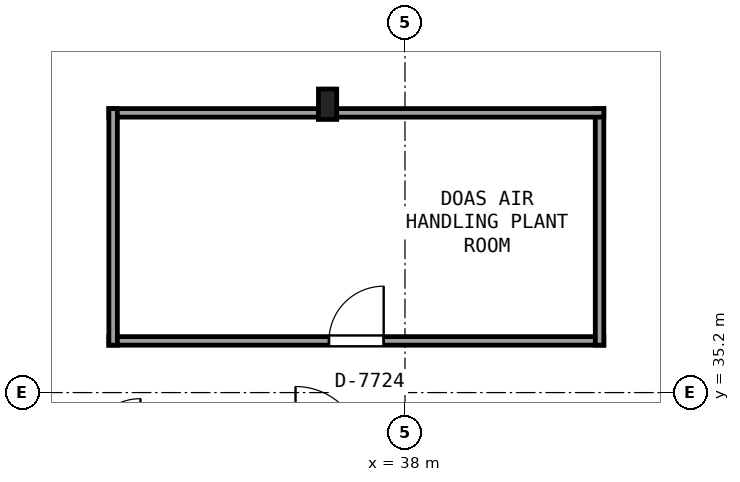
"""IFC4 building model, lengths in metres.
Left out: names, types, materials, properties, quantities, classifications, styles, units other than length and angle.
Written with IfcOpenShell. Run it as: python <this file> out.ifc"""

import sys

from ifc_helpers import new_model, si_unit, direction, frame, frame_2d, origin, origin_2d, place, context, subcontext, project, spatial, rectangle, i_section, extrude, element, fill, save


model = new_model("IFC4")
c1 = context("Model", 3, precision=1e-05, world=origin(), true_north=direction((0.0, 1.0)))
c2 = subcontext(c1, "Body", "Model", "MODEL_VIEW")
j1 = project(units=[si_unit("LENGTHUNIT", "METRE"), si_unit("PLANEANGLEUNIT", "RADIAN")], contexts=[c1])
p1 = place(None, origin())
s1 = spatial("IfcSite", under=j1, at=p1, CompositionType="ELEMENT")
p2 = place(p1, origin())
s2 = spatial("IfcBuilding", under=s1, at=p2, CompositionType="ELEMENT")
p3 = place(p2, frame((0.0, 0.0, 286.7)))
s3 = spatial("IfcBuildingStorey", under=s2, at=p3, CompositionType="ELEMENT", Elevation=286.7)
p4 = place(p3, frame((36.727, 39.942, 0.0), z_axis=(0.0, 0.0, 1.0), x_axis=(1.0, 0.0, 0.0)))
e1 = element("IfcColumn", 1, at=p4, inside=s3, PredefinedType="COLUMN", context=c2, shape_type="SweptSolid", body=[
    extrude(i_section(OverallWidth=0.3, OverallDepth=0.5, WebThickness=0.015, FlangeThickness=0.028, at=origin_2d()), origin(), (0.0, 0.0, 1.0), 2.78),
])
p5 = place(p3, frame((33.13, 36.05, 0.0), z_axis=(0.0, 0.0, 1.0), x_axis=(1.0, 0.0, 0.0)))
e2 = element("IfcWall", 2, at=p5, inside=s3, PredefinedType="PARTITIONING", context=c2, shape_type="SweptSolid", body=[
    extrude(rectangle(XDim=8.14, YDim=0.14, at=frame_2d((4.07, 0.0))), origin(), (0.0, 0.0, 1.0), 2.229),
])
p6 = place(p5, frame((3.62, 0.0, 0.0)))
e3 = element("IfcOpeningElement", 3, at=p6, cuts=e2, PredefinedType="OPENING", context=c2, shape_type="SweptSolid", body=[
    extrude(rectangle(XDim=0.9, YDim=2.0, at=frame_2d((0.45, 1.0))), frame((0.0, 0.08, 0.0), z_axis=(0.0, -1.0, 0.0), x_axis=(1.0, 0.0, 0.0)), (0.0, 0.0, 1.0), 0.16),
])
p7 = place(p3, frame((41.2, 35.98, 0.0), z_axis=(0.0, 0.0, 1.0), x_axis=(0.0, 1.0, 0.0)))
e4 = element("IfcWall", 4, at=p7, inside=s3, PredefinedType="PARTITIONING", context=c2, shape_type="SweptSolid", body=[
    extrude(rectangle(XDim=3.89, YDim=0.14, at=frame_2d((1.945, 0.0))), origin(), (0.0, 0.0, 1.0), 2.305),
])
p8 = place(p3, frame((41.27, 39.8, 0.0), z_axis=(0.0, 0.0, 1.0), x_axis=(-1.0, 0.0, 0.0)))
e5 = element("IfcWall", 5, at=p8, inside=s3, PredefinedType="PARTITIONING", context=c2, shape_type="SweptSolid", body=[
    extrude(rectangle(XDim=8.14, YDim=0.14, at=frame_2d((4.07, 0.0))), origin(), (0.0, 0.0, 1.0), 2.229),
])
p9 = place(p3, frame((33.2, 39.87, 0.0), z_axis=(0.0, 0.0, 1.0), x_axis=(0.0, -1.0, 0.0)))
e6 = element("IfcWall", 6, at=p9, inside=s3, PredefinedType="PARTITIONING", context=c2, shape_type="SweptSolid", body=[
    extrude(rectangle(XDim=3.89, YDim=0.14, at=frame_2d((1.945, 0.0))), origin(), (0.0, 0.0, 1.0), 2.305),
])
p10 = place(p6, origin())
e7 = element("IfcDoor", 7, at=p10, inside=s3, OperationType="SINGLE_SWING_RIGHT", PredefinedType="DOOR", context=c2, shape_type="SweptSolid", body=[
    extrude(rectangle(XDim=0.9, YDim=2.0, at=frame_2d((0.45, 1.0))), frame((0.0, 0.025, 0.0), z_axis=(0.0, -1.0, 0.0), x_axis=(1.0, 0.0, 0.0)), (0.0, 0.0, 1.0), 0.05),
])
fill(e3, e7)
save(model, sys.argv[1])
